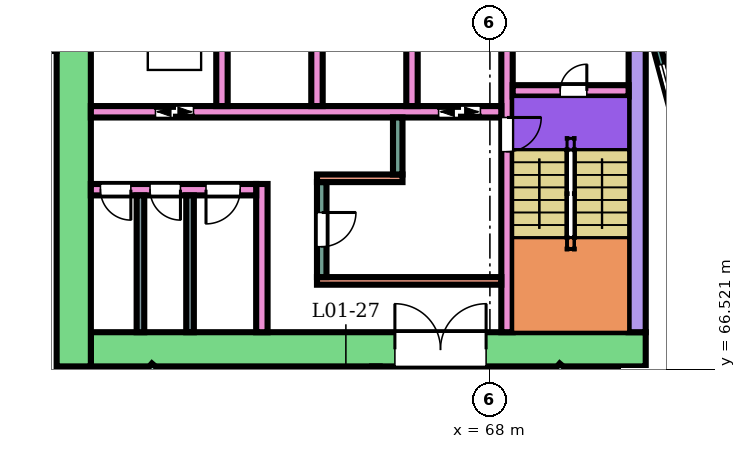
"""IFC4 building model, lengths in metres.
Left out: names, types, materials, properties, quantities, classifications, styles, units other than length and angle.
Written with IfcOpenShell. Run it as: python <this file> out.ifc"""

import sys

from ifc_helpers import new_model, si_unit, direction, frame, frame_2d, origin, place, context, subcontext, project, spatial, rectangle, extrude, element, fill, save


model = new_model("IFC4")
c1 = context("Model", 3, precision=1e-05, world=origin(), true_north=direction((0.0, 1.0)))
c2 = subcontext(c1, "Body", "Model", "MODEL_VIEW")
j1 = project(units=[si_unit("LENGTHUNIT", "METRE"), si_unit("PLANEANGLEUNIT", "RADIAN")], contexts=[c1])
p1 = place(None, origin())
s1 = spatial("IfcSite", under=j1, at=p1, CompositionType="ELEMENT")
p2 = place(p1, origin())
s2 = spatial("IfcBuilding", under=s1, at=p2, CompositionType="ELEMENT")
p3 = place(p2, frame((0.0, 0.0, 7.0)))
s3 = spatial("IfcBuildingStorey", under=s2, at=p3, CompositionType="ELEMENT", Elevation=7.0)
p4 = place(p3, frame((72.1, 67.05, 0.0), z_axis=(0.0, 0.0, 1.0), x_axis=(-1.0, 0.0, 0.0)))
e1 = element("IfcWall", 1, at=p4, inside=s3, PredefinedType="SHEAR", context=c2, shape_type="SweptSolid", body=[
    extrude(rectangle(XDim=14.6, YDim=0.9, at=frame_2d((7.3, 0.0))), origin(), (0.0, 0.0, 1.0), 4.95),
])
p5 = place(p4, frame((4.2, 0.0, 0.0)))
e2 = element("IfcOpeningElement", 2, at=p5, cuts=e1, PredefinedType="OPENING", context=c2, shape_type="SweptSolid", body=[
    extrude(rectangle(XDim=2.4, YDim=2.4, at=frame_2d((1.2, 1.2))), frame((0.0, 0.46, 0.0), z_axis=(0.0, -1.0, 0.0), x_axis=(1.0, 0.0, 0.0)), (0.0, 0.0, 1.0), 0.92),
])
p6 = place(p3, frame((71.875, 75.0, 0.0), z_axis=(0.0, 0.0, 1.0), x_axis=(0.0, -1.0, 0.0)))
e3 = element("IfcWall", 3, at=p6, inside=s3, PredefinedType="SHEAR", context=c2, shape_type="SweptSolid", body=[
    extrude(rectangle(XDim=7.5, YDim=0.45, at=frame_2d((3.75, 0.0))), origin(), (0.0, 0.0, 1.0), 4.95),
])
p7 = place(p3, frame((57.05, 83.4, 0.0), z_axis=(0.0, 0.0, 1.0), x_axis=(0.0, -1.0, 0.0)))
e4 = element("IfcWall", 4, at=p7, inside=s3, PredefinedType="SHEAR", context=c2, shape_type="SweptSolid", body=[
    extrude(rectangle(XDim=16.8, YDim=0.9, at=frame_2d((8.4, 0.0))), origin(), (0.0, 0.0, 1.0), 4.95),
])
p8 = place(p3, frame((68.45, 75.0, 0.0), z_axis=(0.0, 0.0, 1.0), x_axis=(0.0, -1.0, 0.0)))
e5 = element("IfcWall", 5, at=p8, inside=s3, PredefinedType="SHEAR", context=c2, shape_type="SweptSolid", body=[
    extrude(rectangle(XDim=7.5, YDim=0.3, at=frame_2d((3.75, 0.0))), origin(), (0.0, 0.0, 1.0), 4.95),
])
p9 = place(p8, frame((1.85, 0.0, 0.0)))
e6 = element("IfcOpeningElement", 6, at=p9, cuts=e5, PredefinedType="OPENING", context=c2, shape_type="SweptSolid", body=[
    extrude(rectangle(XDim=0.9, YDim=2.1, at=frame_2d((0.45, 1.05))), frame((0.0, 0.16, 0.0), z_axis=(0.0, -1.0, 0.0), x_axis=(1.0, 0.0, 0.0)), (0.0, 0.0, 1.0), 0.32),
])
p10 = place(p3, frame((71.65, 73.85, 0.0), z_axis=(0.0, 0.0, 1.0), x_axis=(-1.0, 0.0, 0.0)))
e7 = element("IfcWall", 7, at=p10, inside=s3, PredefinedType="SHEAR", context=c2, shape_type="SweptSolid", body=[
    extrude(rectangle(XDim=3.05, YDim=0.3, at=frame_2d((1.525, 0.0))), origin(), (0.0, 0.0, 1.0), 4.95),
])
p11 = place(p10, frame((1.1, 0.0, 0.0)))
e8 = element("IfcOpeningElement", 8, at=p11, cuts=e7, PredefinedType="OPENING", context=c2, shape_type="SweptSolid", body=[
    extrude(rectangle(XDim=0.7, YDim=2.0, at=frame_2d((0.35, 1.0))), frame((0.0, 0.16, 0.0), z_axis=(0.0, -1.0, 0.0), x_axis=(1.0, 0.0, 0.0)), (0.0, 0.0, 1.0), 0.32),
])
p12 = place(p3, frame((68.3, 73.3, 0.0), z_axis=(0.0, 0.0, 1.0), x_axis=(-1.0, 0.0, 0.0)))
e9 = element("IfcWall", 9, at=p12, inside=s3, PredefinedType="SHEAR", context=c2, shape_type="SweptSolid", body=[
    extrude(rectangle(XDim=10.8, YDim=0.3, at=frame_2d((5.4, 0.0))), origin(), (0.0, 0.0, 1.0), 4.95),
])
p13 = place(p12, frame((0.55, 0.0, 0.0)))
e10 = element("IfcOpeningElement", 10, at=p13, cuts=e9, PredefinedType="OPENING", context=c2, shape_type="SweptSolid", body=[
    extrude(rectangle(XDim=1.1, YDim=2.1, at=frame_2d((0.55, 1.05))), frame((0.0, 0.16, 0.0), z_axis=(0.0, -1.0, 0.0), x_axis=(1.0, 0.0, 0.0)), (0.0, 0.0, 1.0), 0.32),
])
p14 = place(p12, frame((8.1, 0.0, 0.0)))
e11 = element("IfcOpeningElement", 11, at=p14, cuts=e9, PredefinedType="OPENING", context=c2, shape_type="SweptSolid", body=[
    extrude(rectangle(XDim=1.0, YDim=2.1, at=frame_2d((0.5, 1.05))), frame((0.0, 0.16, 0.0), z_axis=(0.0, -1.0, 0.0), x_axis=(1.0, 0.0, 0.0)), (0.0, 0.0, 1.0), 0.32),
])
for number, where, z_axis, x_axis in (
    (12, (65.95, 76.0, 0.0), (0.0, 0.0, 1.0), (0.0, -1.0, 0.0)),
    (13, (63.45, 76.0, 0.0), (0.0, 0.0, 1.0), (0.0, -1.0, 0.0)),
    (14, (60.95, 76.0, 0.0), (0.0, 0.0, 1.0), (0.0, -1.0, 0.0)),
):
    element("IfcWall", number, at=place(p3, frame(where, z_axis=z_axis, x_axis=x_axis)), inside=s3, PredefinedType="SHEAR", context=c2, shape_type="SweptSolid", body=[
        extrude(rectangle(XDim=2.55, YDim=0.3, at=frame_2d((1.275, 0.0))), origin(), (0.0, 0.0, 1.0), 4.95),
    ])
p15 = place(p3, frame((68.3, 68.85, 0.0), z_axis=(0.0, 0.0, 1.0), x_axis=(-1.0, 0.0, 0.0)))
e15 = element("IfcWall", 15, at=p15, inside=s3, PredefinedType="SHEAR", context=c2, shape_type="SweptSolid", body=[
    extrude(rectangle(XDim=4.85, YDim=0.2, at=frame_2d((2.425, 0.0))), origin(), (0.0, 0.0, 1.0), 4.95),
])
p16 = place(p3, frame((63.575, 71.45, 0.0), z_axis=(0.0, 0.0, 1.0), x_axis=(0.0, -1.0, 0.0)))
e16 = element("IfcWall", 16, at=p16, inside=s3, PredefinedType="SHEAR", context=c2, shape_type="SweptSolid", body=[
    extrude(rectangle(XDim=2.5, YDim=0.25, at=frame_2d((1.25, 0.0))), origin(), (0.0, 0.0, 1.0), 4.95),
])
p17 = place(p16, frame((0.8, 0.0, 0.0)))
e17 = element("IfcOpeningElement", 17, at=p17, cuts=e16, PredefinedType="OPENING", context=c2, shape_type="SweptSolid", body=[
    extrude(rectangle(XDim=0.9, YDim=2.1, at=frame_2d((0.45, 1.05))), frame((0.0, 0.135, 0.0), z_axis=(0.0, -1.0, 0.0), x_axis=(1.0, 0.0, 0.0)), (0.0, 0.0, 1.0), 0.27),
])
p18 = place(p3, frame((65.7, 71.55, 0.0), z_axis=(0.0, 0.0, 1.0), x_axis=(-1.0, 0.0, 0.0)))
e18 = element("IfcWall", 18, at=p18, inside=s3, PredefinedType="SHEAR", context=c2, shape_type="SweptSolid", body=[
    extrude(rectangle(XDim=2.25, YDim=0.2, at=frame_2d((1.125, 0.0))), origin(), (0.0, 0.0, 1.0), 4.95),
])
p19 = place(p3, frame((65.575, 73.15, 0.0), z_axis=(0.0, 0.0, 1.0), x_axis=(0.0, -1.0, 0.0)))
e19 = element("IfcWall", 19, at=p19, inside=s3, PredefinedType="SHEAR", context=c2, shape_type="SweptSolid", body=[
    extrude(rectangle(XDim=1.5, YDim=0.25, at=frame_2d((0.75, 0.0))), origin(), (0.0, 0.0, 1.0), 4.95),
])
p20 = place(p3, frame((62.0, 71.4, 0.0), z_axis=(0.0, 0.0, 1.0), x_axis=(0.0, -1.0, 0.0)))
e20 = element("IfcWall", 20, at=p20, inside=s3, PredefinedType="SHEAR", context=c2, shape_type="SweptSolid", body=[
    extrude(rectangle(XDim=3.9, YDim=0.3, at=frame_2d((1.95, 0.0))), origin(), (0.0, 0.0, 1.0), 4.95),
])
p21 = place(p3, frame((61.85, 71.25, 0.0), z_axis=(0.0, 0.0, 1.0), x_axis=(-1.0, 0.0, 0.0)))
e21 = element("IfcWall", 21, at=p21, inside=s3, PredefinedType="SHEAR", context=c2, shape_type="SweptSolid", body=[
    extrude(rectangle(XDim=4.35, YDim=0.3, at=frame_2d((2.175, 0.0))), origin(), (0.0, 0.0, 1.0), 4.95),
])
p22 = place(p21, frame((0.42, 0.0, 0.0)))
e22 = element("IfcOpeningElement", 22, at=p22, cuts=e21, PredefinedType="OPENING", context=c2, shape_type="SweptSolid", body=[
    extrude(rectangle(XDim=0.9, YDim=2.1, at=frame_2d((0.45, 1.05))), frame((0.0, 0.16, 0.0), z_axis=(0.0, -1.0, 0.0), x_axis=(1.0, 0.0, 0.0)), (0.0, 0.0, 1.0), 0.32),
])
p23 = place(p21, frame((1.992, 0.0, 0.0)))
e23 = element("IfcOpeningElement", 23, at=p23, cuts=e21, PredefinedType="OPENING", context=c2, shape_type="SweptSolid", body=[
    extrude(rectangle(XDim=0.8, YDim=2.1, at=frame_2d((0.4, 1.05))), frame((0.0, 0.16, 0.0), z_axis=(0.0, -1.0, 0.0), x_axis=(1.0, 0.0, 0.0)), (0.0, 0.0, 1.0), 0.32),
])
p24 = place(p21, frame((3.298, 0.0, 0.0)))
e24 = element("IfcOpeningElement", 24, at=p24, cuts=e21, PredefinedType="OPENING", context=c2, shape_type="SweptSolid", body=[
    extrude(rectangle(XDim=0.8, YDim=2.1, at=frame_2d((0.4, 1.05))), frame((0.0, 0.16, 0.0), z_axis=(0.0, -1.0, 0.0), x_axis=(1.0, 0.0, 0.0)), (0.0, 0.0, 1.0), 0.32),
])
p25 = place(p3, frame((72.396, 75.0, 0.0), z_axis=(0.0, 0.0, 1.0), x_axis=(0.258789828301, -0.965933654434, 0.0)))
e25 = element("IfcWall", 25, at=p25, inside=s3, PredefinedType="NOTDEFINED", context=c2, shape_type="SweptSolid", body=[
    extrude(rectangle(XDim=3.936, YDim=0.2, at=frame_2d((1.968, 0.0))), origin(), (0.0, 0.0, 1.0), 5.4),
])
p26 = place(p25, frame((0.468, 0.0, 0.9)))
e26 = element("IfcOpeningElement", 26, at=p26, cuts=e25, PredefinedType="OPENING", context=c2, shape_type="SweptSolid", body=[
    extrude(rectangle(XDim=3.0, YDim=2.3, at=frame_2d((1.5, 1.15))), frame((0.0, 0.11, 0.0), z_axis=(0.0, -1.0, 0.0), x_axis=(1.0, 0.0, 0.0)), (0.0, 0.0, 1.0), 0.22),
])
p27 = place(p3, frame((59.042, 66.601, 0.0), z_axis=(0.0, 0.0, 1.0), x_axis=(0.757804642565, -0.652481512157, 0.0)))
e27 = element("IfcWall", 27, at=p27, inside=s3, PredefinedType="PARTITIONING", context=c2, shape_type="SweptSolid", body=[
    extrude(rectangle(XDim=8.794, YDim=0.2, at=frame_2d((4.397, 0.0))), origin(), (0.0, 0.0, 1.0), 4.95),
])
p28 = place(p27, frame((0.389, 0.0, 0.0)))
e28 = element("IfcOpeningElement", 28, at=p28, cuts=e27, PredefinedType="OPENING", context=c2, shape_type="SweptSolid", body=[
    extrude(rectangle(XDim=0.9, YDim=2.1, at=frame_2d((0.45, 1.05))), frame((0.0, 0.11, 0.0), z_axis=(0.0, -1.0, 0.0), x_axis=(1.0, 0.0, 0.0)), (0.0, 0.0, 1.0), 0.22),
])
p29 = place(p27, frame((2.285, 0.0, 0.0)))
e29 = element("IfcOpeningElement", 29, at=p29, cuts=e27, PredefinedType="OPENING", context=c2, shape_type="SweptSolid", body=[
    extrude(rectangle(XDim=0.9, YDim=2.1, at=frame_2d((0.45, 1.05))), frame((0.0, 0.11, 0.0), z_axis=(0.0, -1.0, 0.0), x_axis=(1.0, 0.0, 0.0)), (0.0, 0.0, 1.0), 0.22),
])
p30 = place(p27, frame((4.24, 0.0, 0.0)))
e30 = element("IfcOpeningElement", 30, at=p30, cuts=e27, PredefinedType="OPENING", context=c2, shape_type="SweptSolid", body=[
    extrude(rectangle(XDim=0.9, YDim=2.1, at=frame_2d((0.45, 1.05))), frame((0.0, 0.11, 0.0), z_axis=(0.0, -1.0, 0.0), x_axis=(1.0, 0.0, 0.0)), (0.0, 0.0, 1.0), 0.22),
])
p31 = place(p27, frame((5.963, 0.0, 0.0)))
e31 = element("IfcOpeningElement", 31, at=p31, cuts=e27, PredefinedType="OPENING", context=c2, shape_type="SweptSolid", body=[
    extrude(rectangle(XDim=0.9, YDim=2.1, at=frame_2d((0.45, 1.05))), frame((0.0, 0.11, 0.0), z_axis=(0.0, -1.0, 0.0), x_axis=(1.0, 0.0, 0.0)), (0.0, 0.0, 1.0), 0.22),
])
p32 = place(p27, frame((7.622, 0.0, 0.0)))
e32 = element("IfcOpeningElement", 32, at=p32, cuts=e27, PredefinedType="OPENING", context=c2, shape_type="SweptSolid", body=[
    extrude(rectangle(XDim=0.9, YDim=2.1, at=frame_2d((0.45, 1.05))), frame((0.0, 0.11, 0.0), z_axis=(0.0, -1.0, 0.0), x_axis=(1.0, 0.0, 0.0)), (0.0, 0.0, 1.0), 0.22),
])
p33 = place(p3, frame((65.0, 65.2, 0.0), z_axis=(0.0, 0.0, 1.0), x_axis=(0.0, 1.0, 0.0)))
e33 = element("IfcWall", 33, at=p33, inside=s3, PredefinedType="PARTITIONING", context=c2, shape_type="SweptSolid", body=[
    extrude(rectangle(XDim=1.399, YDim=0.2, at=frame_2d((0.7, 0.0))), origin(), (0.0, 0.0, 1.0), 4.95),
])
p34 = place(p3, frame((69.771, 66.6, 0.0), z_axis=(0.0, 0.0, 1.0), x_axis=(0.758040611529, -0.652207352974, 0.0)))
e34 = element("IfcWall", 34, at=p34, inside=s3, PredefinedType="PARTITIONING", context=c2, shape_type="SweptSolid", body=[
    extrude(rectangle(XDim=4.625, YDim=0.2, at=frame_2d((2.312, 0.0))), origin(), (0.0, 0.0, 1.0), 4.95),
])
p35 = place(p34, frame((1.887, 0.0, 0.0)))
e35 = element("IfcOpeningElement", 35, at=p35, cuts=e34, PredefinedType="OPENING", context=c2, shape_type="SweptSolid", body=[
    extrude(rectangle(XDim=0.9, YDim=2.1, at=frame_2d((0.45, 1.05))), frame((0.0, 0.11, 0.0), z_axis=(0.0, -1.0, 0.0), x_axis=(1.0, 0.0, 0.0)), (0.0, 0.0, 1.0), 0.22),
])
for number, where, z_axis, x_axis in (
    (36, (60.11, 71.1, 0.0), (0.0, 0.0, 1.0), (0.0, -1.0, 0.0)),
    (37, (58.805, 71.1, 0.0), (0.0, 0.0, 1.0), (0.0, -1.0, 0.0)),
):
    element("IfcWall", number, at=place(p3, frame(where, z_axis=z_axis, x_axis=x_axis)), inside=s3, PredefinedType="PARTITIONING", context=c2, shape_type="SweptSolid", body=[
        extrude(rectangle(XDim=3.6, YDim=0.2, at=frame_2d((1.8, 0.0))), origin(), (0.0, 0.0, 1.0), 4.95),
    ])
p36 = place(p26, origin())
e38 = element("IfcWindow", 38, at=p36, inside=s3, PartitioningType="SINGLE_PANEL", PredefinedType="WINDOW", context=c2, shape_type="SweptSolid", body=[
    extrude(rectangle(XDim=3.0, YDim=2.3, at=frame_2d((1.5, 1.15))), frame((0.0, 0.03, 0.0), z_axis=(0.0, -1.0, 0.0), x_axis=(1.0, 0.0, 0.0)), (0.0, 0.0, 1.0), 0.06),
])
fill(e26, e38)
p37 = place(p11, frame((0.7, 0.0, 0.0), z_axis=(0.0, 0.0, 1.0), x_axis=(-1.0, 0.0, 0.0)))
e39 = element("IfcDoor", 39, at=p37, inside=s3, OperationType="SINGLE_SWING_RIGHT", PredefinedType="DOOR", context=c2, shape_type="SweptSolid", body=[
    extrude(rectangle(XDim=0.7, YDim=2.0, at=frame_2d((0.35, 1.0))), frame((0.0, 0.025, 0.0), z_axis=(0.0, -1.0, 0.0), x_axis=(1.0, 0.0, 0.0)), (0.0, 0.0, 1.0), 0.05),
])
fill(e8, e39)
p38 = place(p9, origin())
e40 = element("IfcDoor", 40, at=p38, inside=s3, OperationType="SINGLE_SWING_LEFT", PredefinedType="DOOR", context=c2, shape_type="SweptSolid", body=[
    extrude(rectangle(XDim=0.9, YDim=2.1, at=frame_2d((0.45, 1.05))), frame((0.0, 0.025, 0.0), z_axis=(0.0, -1.0, 0.0), x_axis=(1.0, 0.0, 0.0)), (0.0, 0.0, 1.0), 0.05),
])
fill(e6, e40)
p39 = place(p13, origin())
e41 = element("IfcDoor", 41, at=p39, inside=s3, OperationType="DOUBLE_DOOR_SLIDING", PredefinedType="DOOR", context=c2, shape_type="SweptSolid", body=[
    extrude(rectangle(XDim=1.1, YDim=2.1, at=frame_2d((0.55, 1.05))), frame((0.0, 0.025, 0.0), z_axis=(0.0, -1.0, 0.0), x_axis=(1.0, 0.0, 0.0)), (0.0, 0.0, 1.0), 0.05),
])
fill(e10, e41)
p40 = place(p14, origin())
e42 = element("IfcDoor", 42, at=p40, inside=s3, OperationType="DOUBLE_DOOR_SLIDING", PredefinedType="DOOR", context=c2, shape_type="SweptSolid", body=[
    extrude(rectangle(XDim=1.0, YDim=2.1, at=frame_2d((0.5, 1.05))), frame((0.0, 0.025, 0.0), z_axis=(0.0, -1.0, 0.0), x_axis=(1.0, 0.0, 0.0)), (0.0, 0.0, 1.0), 0.05),
])
fill(e11, e42)
p41 = place(p17, origin())
e43 = element("IfcDoor", 43, at=p41, inside=s3, OperationType="SINGLE_SWING_LEFT", PredefinedType="DOOR", context=c2, shape_type="SweptSolid", body=[
    extrude(rectangle(XDim=0.9, YDim=2.1, at=frame_2d((0.45, 1.05))), frame((0.0, 0.025, 0.0), z_axis=(0.0, -1.0, 0.0), x_axis=(1.0, 0.0, 0.0)), (0.0, 0.0, 1.0), 0.05),
])
fill(e17, e43)
p42 = place(p22, origin())
e44 = element("IfcDoor", 44, at=p42, inside=s3, OperationType="SINGLE_SWING_RIGHT", PredefinedType="DOOR", context=c2, shape_type="SweptSolid", body=[
    extrude(rectangle(XDim=0.9, YDim=2.1, at=frame_2d((0.45, 1.05))), frame((0.0, 0.025, 0.0), z_axis=(0.0, -1.0, 0.0), x_axis=(1.0, 0.0, 0.0)), (0.0, 0.0, 1.0), 0.05),
])
fill(e22, e44)
p43 = place(p23, origin())
e45 = element("IfcDoor", 45, at=p43, inside=s3, OperationType="SINGLE_SWING_LEFT", PredefinedType="DOOR", context=c2, shape_type="SweptSolid", body=[
    extrude(rectangle(XDim=0.8, YDim=2.1, at=frame_2d((0.4, 1.05))), frame((0.0, 0.025, 0.0), z_axis=(0.0, -1.0, 0.0), x_axis=(1.0, 0.0, 0.0)), (0.0, 0.0, 1.0), 0.05),
])
fill(e23, e45)
p44 = place(p24, origin())
e46 = element("IfcDoor", 46, at=p44, inside=s3, OperationType="SINGLE_SWING_LEFT", PredefinedType="DOOR", context=c2, shape_type="SweptSolid", body=[
    extrude(rectangle(XDim=0.8, YDim=2.1, at=frame_2d((0.4, 1.05))), frame((0.0, 0.025, 0.0), z_axis=(0.0, -1.0, 0.0), x_axis=(1.0, 0.0, 0.0)), (0.0, 0.0, 1.0), 0.05),
])
fill(e24, e46)
p45 = place(p5, frame((2.4, 0.0, 0.0), z_axis=(0.0, 0.0, 1.0), x_axis=(-1.0, 0.0, 0.0)))
e47 = element("IfcDoor", 47, at=p45, inside=s3, OperationType="DOUBLE_DOOR_SINGLE_SWING", PredefinedType="DOOR", context=c2, shape_type="SweptSolid", body=[
    extrude(rectangle(XDim=2.4, YDim=2.4, at=frame_2d((1.2, 1.2))), frame((0.0, 0.025, 0.0), z_axis=(0.0, -1.0, 0.0), x_axis=(1.0, 0.0, 0.0)), (0.0, 0.0, 1.0), 0.05),
])
fill(e2, e47)
save(model, sys.argv[1])
